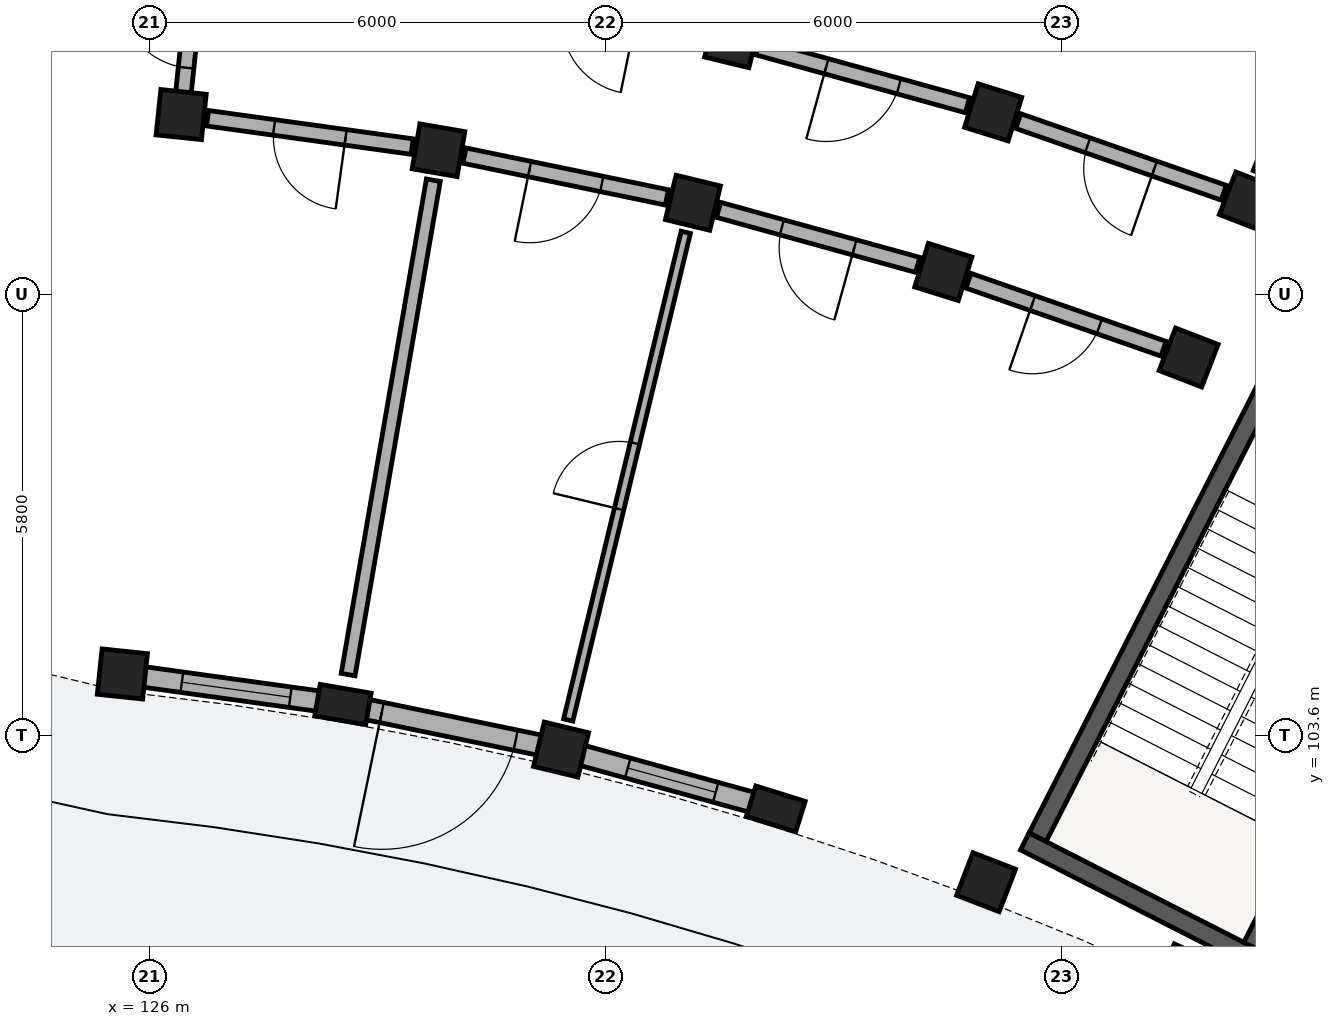
"""IFC4 building model, lengths in metres.
Left out: names, types, materials, properties, quantities, classifications, styles, units other than length and angle.
Written with IfcOpenShell. Run it as: python <this file> out.ifc"""

import sys

from ifc_helpers import new_model, si_unit, direction, frame, frame_2d, origin, origin_2d, place, context, subcontext, project, spatial, rectangle, extrude, element, fill, save


model = new_model("IFC4")
c1 = context("Model", 3, precision=1e-05, world=origin(), true_north=direction((0.0, 1.0)))
c2 = subcontext(c1, "Body", "Model", "MODEL_VIEW")
j1 = project(units=[si_unit("LENGTHUNIT", "METRE"), si_unit("PLANEANGLEUNIT", "RADIAN")], contexts=[c1])
p1 = place(None, origin())
s1 = spatial("IfcSite", under=j1, at=p1, CompositionType="ELEMENT")
p2 = place(p1, origin())
s2 = spatial("IfcBuilding", under=s1, at=p2, CompositionType="ELEMENT")
p3 = place(p2, origin())
s3 = spatial("IfcBuildingStorey", under=s2, at=p3, CompositionType="ELEMENT", Elevation=0.0)
p4 = place(p3, frame((140.684, 108.139, 0.0), z_axis=(0.0, 0.0, 1.0), x_axis=(-0.453992276384, -0.891005618941, 0.0)))
e1 = element("IfcWall", 1, at=p4, inside=s3, PredefinedType="SHEAR", context=c2, shape_type="SweptSolid", body=[
    extrude(rectangle(XDim=6.6, YDim=0.25, at=frame_2d((3.3, 0.0))), origin(), (0.0, 0.0, 1.0), 4.48),
])
p5 = place(p3, frame((137.52, 102.203, 0.0), z_axis=(0.0, 0.0, 1.0), x_axis=(0.891003540237, -0.453996356025, 0.0)))
e2 = element("IfcWall", 2, at=p5, inside=s3, PredefinedType="SHEAR", context=c2, shape_type="SweptSolid", body=[
    extrude(rectangle(XDim=3.42, YDim=0.25, at=frame_2d((1.71, 0.0))), origin(), (0.0, 0.0, 1.0), 4.48),
])
p6 = place(p3, frame((143.509, 106.699, 0.0), z_axis=(0.0, 0.0, 1.0), x_axis=(-0.453992276384, -0.891005618941, 0.0)))
e3 = element("IfcWall", 3, at=p6, inside=s3, PredefinedType="SHEAR", context=c2, shape_type="SweptSolid", body=[
    extrude(rectangle(XDim=6.6, YDim=0.25, at=frame_2d((3.3, 0.0))), origin(), (0.0, 0.0, 1.0), 4.48),
])
p7 = place(p6, frame((0.22, 0.0, 0.0)))
e4 = element("IfcOpeningElement", 4, at=p7, cuts=e3, PredefinedType="OPENING", context=c2, shape_type="SweptSolid", body=[
    extrude(rectangle(XDim=1.05, YDim=2.15, at=frame_2d((0.525, 1.075))), frame((0.0, 0.135, 0.0), z_axis=(0.0, -1.0, 0.0), x_axis=(1.0, 0.0, 0.0)), (0.0, 0.0, 1.0), 0.27),
])
p8 = place(p3, frame((139.707, 100.522, 0.0), z_axis=(0.0, 0.0, 1.0), x_axis=(0.420859860775, 0.907125668024, 0.0)))
e5 = element("IfcColumn", 5, at=p8, inside=s3, PredefinedType="PILASTER", context=c2, shape_type="SweptSolid", body=[
    extrude(rectangle(XDim=0.42, YDim=0.68, at=origin_2d()), origin(), (0.0, 0.0, 1.0), 4.485),
])
for number, where, z_axis, x_axis in (
    (6, (137.01, 101.667, 0.0), (0.0, 0.0, 1.0), (0.36, 0.933, 0.0)),
    (7, (139.675, 108.57, 0.0), (0.0, 0.0, 1.0), (0.36, 0.933, 0.0)),
    (8, (140.468, 110.622, 0.0), (0.0, 0.0, 1.0), (0.36, 0.933, 0.0)),
):
    element("IfcColumn", number, at=place(p3, frame(where, z_axis=z_axis, x_axis=x_axis)), inside=s3, PredefinedType="COLUMN", context=c2, shape_type="SweptSolid", body=[
        extrude(rectangle(XDim=0.6, YDim=0.6, at=origin_2d()), origin(), (0.0, 0.0, 1.0), 4.485),
    ])
p9 = place(p3, frame((134.243, 102.631, 0.0), z_axis=(0.0, 0.0, 1.0), x_axis=(0.297930225503, 0.954587649581, 0.0)))
e9 = element("IfcColumn", 9, at=p9, inside=s3, PredefinedType="PILASTER", context=c2, shape_type="SweptSolid", body=[
    extrude(rectangle(XDim=0.42, YDim=0.68, at=origin_2d()), origin(), (0.0, 0.0, 1.0), 4.485),
])
for number, where, z_axis, x_axis in (
    (10, (136.448, 109.695, 0.0), (0.0, 0.0, 1.0), (0.298, 0.955, 0.0)),
    (11, (137.103, 111.795, 0.0), (0.0, 0.0, 1.0), (0.298, 0.955, 0.0)),
    (12, (131.418, 103.412, 0.0), (0.0, 0.0, 1.0), (0.234, 0.972, 0.0)),
    (13, (133.153, 110.606, 0.0), (0.0, 0.0, 1.0), (0.234, 0.972, 0.0)),
    (14, (133.669, 112.744, 0.0), (0.0, 0.0, 1.0), (0.234, 0.972, 0.0)),
):
    element("IfcColumn", number, at=place(p3, frame(where, z_axis=z_axis, x_axis=x_axis)), inside=s3, PredefinedType="COLUMN", context=c2, shape_type="SweptSolid", body=[
        extrude(rectangle(XDim=0.6, YDim=0.6, at=origin_2d()), origin(), (0.0, 0.0, 1.0), 4.485),
    ])
p10 = place(p3, frame((128.549, 104.004, 0.0), z_axis=(0.0, 0.0, 1.0), x_axis=(0.169827230012, 0.985473851478, 0.0)))
e15 = element("IfcColumn", 15, at=p10, inside=s3, PredefinedType="PILASTER", context=c2, shape_type="SweptSolid", body=[
    extrude(rectangle(XDim=0.42, YDim=0.68, at=origin_2d()), origin(), (0.0, 0.0, 1.0), 4.485),
])
for number, where, z_axis, x_axis in (
    (16, (129.806, 111.297, 0.0), (0.0, 0.0, 1.0), (0.17, 0.985, 0.0)),
    (17, (125.646, 104.406, 0.0), (0.0, 0.0, 1.0), (0.105, 0.995, 0.0)),
    (18, (126.42, 111.766, 0.0), (0.0, 0.0, 1.0), (0.105, 0.995, 0.0)),
):
    element("IfcColumn", number, at=place(p3, frame(where, z_axis=z_axis, x_axis=x_axis)), inside=s3, PredefinedType="COLUMN", context=c2, shape_type="SweptSolid", body=[
        extrude(rectangle(XDim=0.6, YDim=0.6, at=origin_2d()), origin(), (0.0, 0.0, 1.0), 4.485),
    ])
p11 = place(p3, frame((134.07, 102.679, 0.0), z_axis=(0.0, 0.0, 1.0), x_axis=(-0.963904687378, 0.266247542056, 0.0)))
e19 = element("IfcWall", 19, at=p11, inside=s3, PredefinedType="SOLIDWALL", context=c2, shape_type="SweptSolid", body=[
    extrude(rectangle(XDim=2.48, YDim=0.27, at=frame_2d((1.24, 0.0))), origin(), (0.0, 0.0, 1.0), 3.755),
])
p12 = place(p11, frame((0.64, 0.0, 0.55)))
e20 = element("IfcOpeningElement", 20, at=p12, cuts=e19, PredefinedType="OPENING", context=c2, shape_type="SweptSolid", body=[
    extrude(rectangle(XDim=1.2, YDim=1.51, at=frame_2d((0.6, 0.755))), frame((0.0, 0.145, 0.0), z_axis=(0.0, -1.0, 0.0), x_axis=(1.0, 0.0, 0.0)), (0.0, 0.0, 1.0), 0.29),
])
p13 = place(p3, frame((131.154, 103.466, 0.0), z_axis=(0.0, 0.0, 1.0), x_axis=(-0.979327037211, 0.202283351238, 0.0)))
e21 = element("IfcWall", 21, at=p13, inside=s3, PredefinedType="SOLIDWALL", context=c2, shape_type="SweptSolid", body=[
    extrude(rectangle(XDim=2.48, YDim=0.27, at=frame_2d((1.24, 0.0))), origin(), (0.0, 0.0, 1.0), 3.755),
])
p14 = place(p13, frame((0.34, 0.0, 0.0)))
e22 = element("IfcOpeningElement", 22, at=p14, cuts=e21, PredefinedType="OPENING", context=c2, shape_type="SweptSolid", body=[
    extrude(rectangle(XDim=1.8, YDim=2.15, at=frame_2d((0.9, 1.075))), frame((0.0, 0.145, 0.0), z_axis=(0.0, -1.0, 0.0), x_axis=(1.0, 0.0, 0.0)), (0.0, 0.0, 1.0), 0.29),
])
p15 = place(p3, frame((128.371, 104.029, 0.0), z_axis=(0.0, 0.0, 1.0), x_axis=(-0.990541017993, 0.137216951116, 0.0)))
e23 = element("IfcWall", 23, at=p15, inside=s3, PredefinedType="SOLIDWALL", context=c2, shape_type="SweptSolid", body=[
    extrude(rectangle(XDim=2.48, YDim=0.27, at=frame_2d((1.24, 0.0))), origin(), (0.0, 0.0, 1.0), 3.755),
])
p16 = place(p15, frame((0.52, 0.0, 0.55)))
e24 = element("IfcOpeningElement", 24, at=p16, cuts=e23, PredefinedType="OPENING", context=c2, shape_type="SweptSolid", body=[
    extrude(rectangle(XDim=1.44, YDim=1.66, at=frame_2d((0.72, 0.83))), frame((0.0, 0.145, 0.0), z_axis=(0.0, -1.0, 0.0), x_axis=(1.0, 0.0, 0.0)), (0.0, 0.0, 1.0), 0.29),
])
p17 = place(p3, frame((140.612, 110.996, 0.0), z_axis=(0.0, 0.0, 1.0), x_axis=(0.360186633854, 0.932880264982, 0.0)))
e25 = element("IfcWall", 25, at=p17, inside=s3, PredefinedType="PARTITIONING", context=c2, shape_type="SweptSolid", body=[
    extrude(rectangle(XDim=4.7, YDim=0.185, at=frame_2d((2.35, 0.0))), origin(), (0.0, 0.0, 1.0), 3.1),
])
p18 = place(p3, frame((140.137, 110.738, 0.0), z_axis=(0.0, 0.0, 1.0), x_axis=(-0.944253820929, 0.329218349522, 0.0)))
e26 = element("IfcWall", 26, at=p18, inside=s3, PredefinedType="PARTITIONING", context=c2, shape_type="SweptSolid", body=[
    extrude(rectangle(XDim=2.863, YDim=0.205, at=frame_2d((1.432, 0.0))), origin(), (0.0, 0.0, 1.0), 3.1),
])
p19 = place(p18, frame((0.967, 0.0, 0.0)))
e27 = element("IfcOpeningElement", 27, at=p19, cuts=e26, PredefinedType="OPENING", context=c2, shape_type="SweptSolid", body=[
    extrude(rectangle(XDim=0.93, YDim=2.12, at=frame_2d((0.465, 1.06))), frame((0.0, 0.113, 0.0), z_axis=(0.0, -1.0, 0.0), x_axis=(1.0, 0.0, 0.0)), (0.0, 0.0, 1.0), 0.225),
])
p20 = place(p3, frame((139.345, 108.685, 0.0), z_axis=(0.0, 0.0, 1.0), x_axis=(-0.944265123647, 0.329185929627, 0.0)))
e28 = element("IfcWall", 28, at=p20, inside=s3, PredefinedType="PARTITIONING", context=c2, shape_type="SweptSolid", body=[
    extrude(rectangle(XDim=2.718, YDim=0.205, at=frame_2d((1.359, 0.0))), origin(), (0.0, 0.0, 1.0), 3.1),
])
p21 = place(p20, frame((0.894, 0.0, 0.0)))
e29 = element("IfcOpeningElement", 29, at=p21, cuts=e28, PredefinedType="OPENING", context=c2, shape_type="SweptSolid", body=[
    extrude(rectangle(XDim=0.93, YDim=2.12, at=frame_2d((0.465, 1.06))), frame((0.0, 0.113, 0.0), z_axis=(0.0, -1.0, 0.0), x_axis=(1.0, 0.0, 0.0)), (0.0, 0.0, 1.0), 0.225),
])
p22 = place(p3, frame((136.766, 111.889, 0.0), z_axis=(0.0, 0.0, 1.0), x_axis=(-0.963890789093, 0.266297853356, 0.0)))
e30 = element("IfcWall", 30, at=p22, inside=s3, PredefinedType="PARTITIONING", context=c2, shape_type="SweptSolid", body=[
    extrude(rectangle(XDim=2.863, YDim=0.205, at=frame_2d((1.432, 0.0))), origin(), (0.0, 0.0, 1.0), 3.1),
])
p23 = place(p22, frame((0.937, 0.0, 0.0)))
e31 = element("IfcOpeningElement", 31, at=p23, cuts=e30, PredefinedType="OPENING", context=c2, shape_type="SweptSolid", body=[
    extrude(rectangle(XDim=0.99, YDim=2.16, at=frame_2d((0.495, 1.08))), frame((0.0, 0.113, 0.0), z_axis=(0.0, -1.0, 0.0), x_axis=(1.0, 0.0, 0.0)), (0.0, 0.0, 1.0), 0.225),
])
p24 = place(p3, frame((136.11, 109.789, 0.0), z_axis=(0.0, 0.0, 1.0), x_axis=(-0.96388375821, 0.266323301006, 0.0)))
e32 = element("IfcWall", 32, at=p24, inside=s3, PredefinedType="PARTITIONING", context=c2, shape_type="SweptSolid", body=[
    extrude(rectangle(XDim=2.718, YDim=0.205, at=frame_2d((1.359, 0.0))), origin(), (0.0, 0.0, 1.0), 3.1),
])
p25 = place(p24, frame((0.864, 0.0, 0.0)))
e33 = element("IfcOpeningElement", 33, at=p25, cuts=e32, PredefinedType="OPENING", context=c2, shape_type="SweptSolid", body=[
    extrude(rectangle(XDim=0.99, YDim=2.16, at=frame_2d((0.495, 1.08))), frame((0.0, 0.113, 0.0), z_axis=(0.0, -1.0, 0.0), x_axis=(1.0, 0.0, 0.0)), (0.0, 0.0, 1.0), 0.225),
])
p26 = place(p3, frame((131.512, 103.801, 0.0), z_axis=(0.0, 0.0, 1.0), x_axis=(0.234406698576, 0.972138621629, 0.0)))
e34 = element("IfcWall", 34, at=p26, inside=s3, PredefinedType="PARTITIONING", context=c2, shape_type="SweptSolid", body=[
    extrude(rectangle(XDim=6.6, YDim=0.125, at=frame_2d((3.3, 0.0))), origin(), (0.0, 0.0, 1.0), 3.1),
])
p27 = place(p26, frame((2.855, 0.0, 0.0)))
e35 = element("IfcOpeningElement", 35, at=p27, cuts=e34, PredefinedType="OPENING", context=c2, shape_type="SweptSolid", body=[
    extrude(rectangle(XDim=0.89, YDim=2.1, at=frame_2d((0.445, 1.05))), frame((0.0, 0.073, 0.0), z_axis=(0.0, -1.0, 0.0), x_axis=(1.0, 0.0, 0.0)), (0.0, 0.0, 1.0), 0.145),
])
p28 = place(p3, frame((132.81, 110.677, 0.0), z_axis=(0.0, 0.0, 1.0), x_axis=(-0.979349423541, 0.202174940608, 0.0)))
e36 = element("IfcWall", 36, at=p28, inside=s3, PredefinedType="PARTITIONING", context=c2, shape_type="SweptSolid", body=[
    extrude(rectangle(XDim=2.718, YDim=0.205, at=frame_2d((1.359, 0.0))), origin(), (0.0, 0.0, 1.0), 3.1),
])
p29 = place(p28, frame((0.874, 0.0, 0.0)))
e37 = element("IfcOpeningElement", 37, at=p29, cuts=e36, PredefinedType="OPENING", context=c2, shape_type="SweptSolid", body=[
    extrude(rectangle(XDim=0.97, YDim=2.15, at=frame_2d((0.485, 1.075))), frame((0.0, 0.113, 0.0), z_axis=(0.0, -1.0, 0.0), x_axis=(1.0, 0.0, 0.0)), (0.0, 0.0, 1.0), 0.225),
])
p30 = place(p3, frame((128.617, 104.398, 0.0), z_axis=(0.0, 0.0, 1.0), x_axis=(0.169825160084, 0.985474208187, 0.0)))
e38 = element("IfcWall", 38, at=p30, inside=s3, PredefinedType="PARTITIONING", context=c2, shape_type="SweptSolid", body=[
    extrude(rectangle(XDim=6.6, YDim=0.185, at=frame_2d((3.3, 0.0))), origin(), (0.0, 0.0, 1.0), 3.1),
])
p31 = place(p3, frame((129.459, 111.345, 0.0), z_axis=(0.0, 0.0, 1.0), x_axis=(-0.990535404475, 0.137257467855, 0.0)))
e39 = element("IfcWall", 39, at=p31, inside=s3, PredefinedType="PARTITIONING", context=c2, shape_type="SweptSolid", body=[
    extrude(rectangle(XDim=2.718, YDim=0.205, at=frame_2d((1.359, 0.0))), origin(), (0.0, 0.0, 1.0), 3.1),
])
p32 = place(p31, frame((0.884, 0.0, 0.0)))
e40 = element("IfcOpeningElement", 40, at=p32, cuts=e39, PredefinedType="OPENING", context=c2, shape_type="SweptSolid", body=[
    extrude(rectangle(XDim=0.95, YDim=2.13, at=frame_2d((0.475, 1.065))), frame((0.0, 0.113, 0.0), z_axis=(0.0, -1.0, 0.0), x_axis=(1.0, 0.0, 0.0)), (0.0, 0.0, 1.0), 0.225),
])
p33 = place(p3, frame((126.425, 111.816, 0.0), z_axis=(0.0, 0.0, 1.0), x_axis=(0.104509292252, 0.994523910136, 0.0)))
e41 = element("IfcWall", 41, at=p33, inside=s3, PredefinedType="PARTITIONING", context=c2, shape_type="SweptSolid", body=[
    extrude(rectangle(XDim=2.1, YDim=0.205, at=frame_2d((1.05, 0.0))), origin(), (0.0, 0.0, 1.0), 3.1),
])
p34 = place(p33, frame((0.57, 0.0, 0.0)))
e42 = element("IfcOpeningElement", 42, at=p34, cuts=e41, PredefinedType="OPENING", context=c2, shape_type="SweptSolid", body=[
    extrude(rectangle(XDim=0.95, YDim=2.13, at=frame_2d((0.475, 1.065))), frame((0.0, 0.113, 0.0), z_axis=(0.0, -1.0, 0.0), x_axis=(1.0, 0.0, 0.0)), (0.0, 0.0, 1.0), 0.225),
])
p35 = place(p12, origin())
e43 = element("IfcWindow", 43, at=p35, inside=s3, PartitioningType="SINGLE_PANEL", PredefinedType="WINDOW", context=c2, shape_type="SweptSolid", body=[
    extrude(rectangle(XDim=1.2, YDim=1.51, at=frame_2d((0.6, 0.755))), frame((0.0, 0.03, 0.0), z_axis=(0.0, -1.0, 0.0), x_axis=(1.0, 0.0, 0.0)), (0.0, 0.0, 1.0), 0.06),
])
fill(e20, e43)
p36 = place(p14, origin())
e44 = element("IfcDoor", 44, at=p36, inside=s3, OperationType="DOUBLE_DOOR_SINGLE_SWING", PredefinedType="DOOR", context=c2, shape_type="SweptSolid", body=[
    extrude(rectangle(XDim=1.8, YDim=2.15, at=frame_2d((0.9, 1.075))), frame((0.0, 0.025, 0.0), z_axis=(0.0, -1.0, 0.0), x_axis=(1.0, 0.0, 0.0)), (0.0, 0.0, 1.0), 0.05),
])
fill(e22, e44)
p37 = place(p16, origin())
e45 = element("IfcWindow", 45, at=p37, inside=s3, PartitioningType="SINGLE_PANEL", PredefinedType="WINDOW", context=c2, shape_type="SweptSolid", body=[
    extrude(rectangle(XDim=1.44, YDim=1.66, at=frame_2d((0.72, 0.83))), frame((0.0, 0.03, 0.0), z_axis=(0.0, -1.0, 0.0), x_axis=(1.0, 0.0, 0.0)), (0.0, 0.0, 1.0), 0.06),
])
fill(e24, e45)
p38 = place(p19, origin())
e46 = element("IfcDoor", 46, at=p38, inside=s3, OperationType="SINGLE_SWING_LEFT", PredefinedType="DOOR", context=c2, shape_type="SweptSolid", body=[
    extrude(rectangle(XDim=0.93, YDim=2.12, at=frame_2d((0.465, 1.06))), frame((0.0, 0.025, 0.0), z_axis=(0.0, -1.0, 0.0), x_axis=(1.0, 0.0, 0.0)), (0.0, 0.0, 1.0), 0.05),
])
fill(e27, e46)
p39 = place(p21, origin())
e47 = element("IfcDoor", 47, at=p39, inside=s3, OperationType="SINGLE_SWING_RIGHT", PredefinedType="DOOR", context=c2, shape_type="SweptSolid", body=[
    extrude(rectangle(XDim=0.93, YDim=2.12, at=frame_2d((0.465, 1.06))), frame((0.0, 0.025, 0.0), z_axis=(0.0, -1.0, 0.0), x_axis=(1.0, 0.0, 0.0)), (0.0, 0.0, 1.0), 0.05),
])
fill(e29, e47)
p40 = place(p23, origin())
e48 = element("IfcDoor", 48, at=p40, inside=s3, OperationType="SINGLE_SWING_RIGHT", PredefinedType="DOOR", context=c2, shape_type="SweptSolid", body=[
    extrude(rectangle(XDim=0.99, YDim=2.16, at=frame_2d((0.495, 1.08))), frame((0.0, 0.025, 0.0), z_axis=(0.0, -1.0, 0.0), x_axis=(1.0, 0.0, 0.0)), (0.0, 0.0, 1.0), 0.05),
])
fill(e31, e48)
p41 = place(p25, origin())
e49 = element("IfcDoor", 49, at=p41, inside=s3, OperationType="SINGLE_SWING_LEFT", PredefinedType="DOOR", context=c2, shape_type="SweptSolid", body=[
    extrude(rectangle(XDim=0.99, YDim=2.16, at=frame_2d((0.495, 1.08))), frame((0.0, 0.025, 0.0), z_axis=(0.0, -1.0, 0.0), x_axis=(1.0, 0.0, 0.0)), (0.0, 0.0, 1.0), 0.05),
])
fill(e33, e49)
p42 = place(p27, origin())
e50 = element("IfcDoor", 50, at=p42, inside=s3, OperationType="SINGLE_SWING_LEFT", PredefinedType="DOOR", context=c2, shape_type="SweptSolid", body=[
    extrude(rectangle(XDim=0.89, YDim=2.1, at=frame_2d((0.445, 1.05))), frame((0.0, 0.025, 0.0), z_axis=(0.0, -1.0, 0.0), x_axis=(1.0, 0.0, 0.0)), (0.0, 0.0, 1.0), 0.05),
])
fill(e35, e50)
p43 = place(p29, origin())
e51 = element("IfcDoor", 51, at=p43, inside=s3, OperationType="SINGLE_SWING_RIGHT", PredefinedType="DOOR", context=c2, shape_type="SweptSolid", body=[
    extrude(rectangle(XDim=0.97, YDim=2.15, at=frame_2d((0.485, 1.075))), frame((0.0, 0.025, 0.0), z_axis=(0.0, -1.0, 0.0), x_axis=(1.0, 0.0, 0.0)), (0.0, 0.0, 1.0), 0.05),
])
fill(e37, e51)
p44 = place(p32, origin())
e52 = element("IfcDoor", 52, at=p44, inside=s3, OperationType="SINGLE_SWING_LEFT", PredefinedType="DOOR", context=c2, shape_type="SweptSolid", body=[
    extrude(rectangle(XDim=0.95, YDim=2.13, at=frame_2d((0.475, 1.065))), frame((0.0, 0.025, 0.0), z_axis=(0.0, -1.0, 0.0), x_axis=(1.0, 0.0, 0.0)), (0.0, 0.0, 1.0), 0.05),
])
fill(e40, e52)
p45 = place(p34, origin())
e53 = element("IfcDoor", 53, at=p45, inside=s3, OperationType="SINGLE_SWING_RIGHT", PredefinedType="DOOR", context=c2, shape_type="SweptSolid", body=[
    extrude(rectangle(XDim=0.95, YDim=2.13, at=frame_2d((0.475, 1.065))), frame((0.0, 0.025, 0.0), z_axis=(0.0, -1.0, 0.0), x_axis=(1.0, 0.0, 0.0)), (0.0, 0.0, 1.0), 0.05),
])
fill(e42, e53)
save(model, sys.argv[1])
